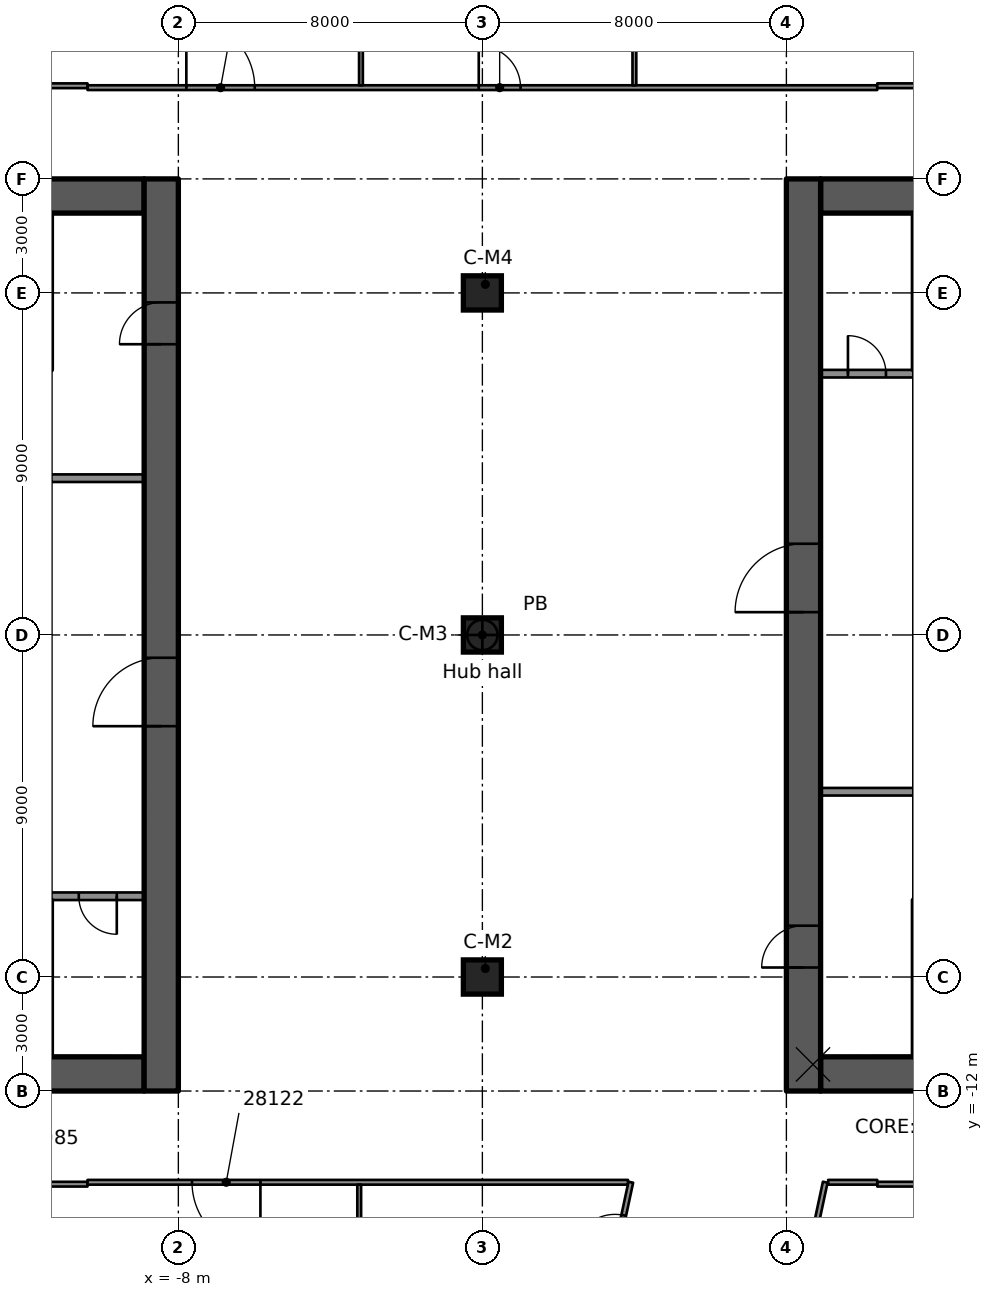
"""IFC4 building model, lengths in metres.
Left out: names, types, materials, properties, quantities, classifications, styles, units other than length and angle.
Written with IfcOpenShell. Run it as: python <this file> out.ifc"""

import sys

from ifc_helpers import new_model, si_unit, direction, frame, frame_2d, origin, origin_2d, place, context, subcontext, project, spatial, rectangle, extrude, element, fill, save


model = new_model("IFC4")
c1 = context("Model", 3, precision=1e-05, world=origin(), true_north=direction((0.0, 1.0)))
c2 = subcontext(c1, "Body", "Model", "MODEL_VIEW")
j1 = project(units=[si_unit("LENGTHUNIT", "METRE"), si_unit("PLANEANGLEUNIT", "RADIAN")], contexts=[c1])
p1 = place(None, origin())
s1 = spatial("IfcSite", under=j1, at=p1, CompositionType="ELEMENT")
p2 = place(p1, origin())
s2 = spatial("IfcBuilding", under=s1, at=p2, CompositionType="ELEMENT")
p3 = place(p2, frame((0.0, 0.0, 145.6)))
s3 = spatial("IfcBuildingStorey", under=s2, at=p3, CompositionType="ELEMENT", Elevation=145.6)
p4 = place(p3, frame((-18.1, 11.55, 0.0), z_axis=(0.0, 0.0, 1.0), x_axis=(1.0, 0.0, 0.0)))
e1 = element("IfcWall", 1, at=p4, inside=s3, PredefinedType="SHEAR", context=c2, shape_type="SweptSolid", body=[
    extrude(rectangle(XDim=9.2, YDim=0.9, at=frame_2d((4.6, 0.0))), origin(), (0.0, 0.0, 1.0), 3.5),
])
p5 = place(p4, frame((5.1, 0.0, 0.0)))
e2 = element("IfcOpeningElement", 2, at=p5, cuts=e1, PredefinedType="OPENING", context=c2, shape_type="SweptSolid", body=[
    extrude(rectangle(XDim=1.1, YDim=2.1, at=frame_2d((0.55, 1.05))), frame((0.0, 0.46, 0.0), z_axis=(0.0, -1.0, 0.0), x_axis=(1.0, 0.0, 0.0)), (0.0, 0.0, 1.0), 0.92),
])
p6 = place(p3, frame((-18.1, -11.55, 0.0), z_axis=(0.0, 0.0, 1.0), x_axis=(1.0, 0.0, 0.0)))
e3 = element("IfcWall", 3, at=p6, inside=s3, PredefinedType="SHEAR", context=c2, shape_type="SweptSolid", body=[
    extrude(rectangle(XDim=9.2, YDim=0.9, at=frame_2d((4.6, 0.0))), origin(), (0.0, 0.0, 1.0), 3.5),
])
p7 = place(p6, frame((5.1, 0.0, 0.0)))
e4 = element("IfcOpeningElement", 4, at=p7, cuts=e3, PredefinedType="OPENING", context=c2, shape_type="SweptSolid", body=[
    extrude(rectangle(XDim=1.1, YDim=2.1, at=frame_2d((0.55, 1.05))), frame((0.0, 0.46, 0.0), z_axis=(0.0, -1.0, 0.0), x_axis=(1.0, 0.0, 0.0)), (0.0, 0.0, 1.0), 0.92),
])
p8 = place(p3, frame((-8.45, -12.0, 0.0), z_axis=(0.0, 0.0, 1.0), x_axis=(0.0, 1.0, 0.0)))
e5 = element("IfcWall", 5, at=p8, inside=s3, PredefinedType="SHEAR", context=c2, shape_type="SweptSolid", body=[
    extrude(rectangle(XDim=24.0, YDim=0.9, at=frame_2d((12.0, 0.0))), origin(), (0.0, 0.0, 1.0), 3.5),
])
p9 = place(p8, frame((9.6, 0.0, 0.0)))
e6 = element("IfcOpeningElement", 6, at=p9, cuts=e5, PredefinedType="OPENING", context=c2, shape_type="SweptSolid", body=[
    extrude(rectangle(XDim=1.8, YDim=2.1, at=frame_2d((0.9, 1.05))), frame((0.0, 0.46, 0.0), z_axis=(0.0, -1.0, 0.0), x_axis=(1.0, 0.0, 0.0)), (0.0, 0.0, 1.0), 0.92),
])
p10 = place(p8, frame((19.65, 0.0, 0.0)))
e7 = element("IfcOpeningElement", 7, at=p10, cuts=e5, PredefinedType="OPENING", context=c2, shape_type="SweptSolid", body=[
    extrude(rectangle(XDim=1.1, YDim=2.1, at=frame_2d((0.55, 1.05))), frame((0.0, 0.46, 0.0), z_axis=(0.0, -1.0, 0.0), x_axis=(1.0, 0.0, 0.0)), (0.0, 0.0, 1.0), 0.92),
])
p11 = place(p3, frame((8.9, 11.55, 0.0), z_axis=(0.0, 0.0, 1.0), x_axis=(1.0, 0.0, 0.0)))
e8 = element("IfcWall", 8, at=p11, inside=s3, PredefinedType="SHEAR", context=c2, shape_type="SweptSolid", body=[
    extrude(rectangle(XDim=9.2, YDim=0.9, at=frame_2d((4.6, 0.0))), origin(), (0.0, 0.0, 1.0), 3.5),
])
p12 = place(p11, frame((3.0, 0.0, 0.0)))
e9 = element("IfcOpeningElement", 9, at=p12, cuts=e8, PredefinedType="OPENING", context=c2, shape_type="SweptSolid", body=[
    extrude(rectangle(XDim=1.1, YDim=2.1, at=frame_2d((0.55, 1.05))), frame((0.0, 0.46, 0.0), z_axis=(0.0, -1.0, 0.0), x_axis=(1.0, 0.0, 0.0)), (0.0, 0.0, 1.0), 0.92),
])
p13 = place(p3, frame((8.9, -11.55, 0.0), z_axis=(0.0, 0.0, 1.0), x_axis=(1.0, 0.0, 0.0)))
e10 = element("IfcWall", 10, at=p13, inside=s3, PredefinedType="SHEAR", context=c2, shape_type="SweptSolid", body=[
    extrude(rectangle(XDim=9.2, YDim=0.9, at=frame_2d((4.6, 0.0))), origin(), (0.0, 0.0, 1.0), 3.5),
])
p14 = place(p13, frame((3.0, 0.0, 0.0)))
e11 = element("IfcOpeningElement", 11, at=p14, cuts=e10, PredefinedType="OPENING", context=c2, shape_type="SweptSolid", body=[
    extrude(rectangle(XDim=1.1, YDim=2.1, at=frame_2d((0.55, 1.05))), frame((0.0, 0.46, 0.0), z_axis=(0.0, -1.0, 0.0), x_axis=(1.0, 0.0, 0.0)), (0.0, 0.0, 1.0), 0.92),
])
p15 = place(p3, frame((8.45, -12.0, 0.0), z_axis=(0.0, 0.0, 1.0), x_axis=(0.0, 1.0, 0.0)))
e12 = element("IfcWall", 12, at=p15, inside=s3, PredefinedType="SHEAR", context=c2, shape_type="SweptSolid", body=[
    extrude(rectangle(XDim=24.0, YDim=0.9, at=frame_2d((12.0, 0.0))), origin(), (0.0, 0.0, 1.0), 3.5),
])
p16 = place(p15, frame((12.6, 0.0, 0.0)))
e13 = element("IfcOpeningElement", 13, at=p16, cuts=e12, PredefinedType="OPENING", context=c2, shape_type="SweptSolid", body=[
    extrude(rectangle(XDim=1.8, YDim=2.1, at=frame_2d((0.9, 1.05))), frame((0.0, 0.46, 0.0), z_axis=(0.0, -1.0, 0.0), x_axis=(1.0, 0.0, 0.0)), (0.0, 0.0, 1.0), 0.92),
])
p17 = place(p15, frame((3.25, 0.0, 0.0)))
e14 = element("IfcOpeningElement", 14, at=p17, cuts=e12, PredefinedType="OPENING", context=c2, shape_type="SweptSolid", body=[
    extrude(rectangle(XDim=1.1, YDim=2.1, at=frame_2d((0.55, 1.05))), frame((0.0, 0.46, 0.0), z_axis=(0.0, -1.0, 0.0), x_axis=(1.0, 0.0, 0.0)), (0.0, 0.0, 1.0), 0.92),
])
for number, where, z_axis, x_axis in (
    (15, (0.0, -9.0, 0.0), (0.0, 0.0, 1.0), (1.0, 0.0, 0.0)),
    (16, (0.0, 0.0, 0.0), (0.0, 0.0, 1.0), (1.0, 0.0, 0.0)),
    (17, (0.0, 9.0, 0.0), (0.0, 0.0, 1.0), (1.0, 0.0, 0.0)),
):
    element("IfcColumn", number, at=place(p3, frame(where, z_axis=z_axis, x_axis=x_axis)), inside=s3, PredefinedType="COLUMN", context=c2, shape_type="SweptSolid", body=[
        extrude(rectangle(XDim=1.0, YDim=0.9, at=origin_2d()), origin(), (0.0, 0.0, 1.0), 3.5),
    ])
p18 = place(p3, frame((-8.9, 4.125, 0.0), z_axis=(0.0, 0.0, 1.0), x_axis=(-1.0, 0.0, 0.0)))
e18 = element("IfcWall", 18, at=p18, inside=s3, PredefinedType="PARTITIONING", context=c2, shape_type="SweptSolid", body=[
    extrude(rectangle(XDim=2.44, YDim=0.2, at=frame_2d((1.22, 0.0))), origin(), (0.0, 0.0, 1.0), 3.09),
])
p19 = place(p3, frame((-8.9, -6.875, 0.0), z_axis=(0.0, 0.0, 1.0), x_axis=(-1.0, 0.0, 0.0)))
e19 = element("IfcWall", 19, at=p19, inside=s3, PredefinedType="PARTITIONING", context=c2, shape_type="SweptSolid", body=[
    extrude(rectangle(XDim=2.44, YDim=0.2, at=frame_2d((1.22, 0.0))), origin(), (0.0, 0.0, 1.0), 3.09),
])
p20 = place(p19, frame((0.72, 0.0, 0.0)))
e20 = element("IfcOpeningElement", 20, at=p20, cuts=e19, PredefinedType="OPENING", context=c2, shape_type="SweptSolid", body=[
    extrude(rectangle(XDim=1.0, YDim=2.1, at=frame_2d((0.5, 1.05))), frame((0.0, 0.11, 0.0), z_axis=(0.0, -1.0, 0.0), x_axis=(1.0, 0.0, 0.0)), (0.0, 0.0, 1.0), 0.22),
])
p21 = place(p3, frame((8.9, -4.125, 0.0), z_axis=(0.0, 0.0, 1.0), x_axis=(1.0, 0.0, 0.0)))
e21 = element("IfcWall", 21, at=p21, inside=s3, PredefinedType="PARTITIONING", context=c2, shape_type="SweptSolid", body=[
    extrude(rectangle(XDim=2.44, YDim=0.2, at=frame_2d((1.22, 0.0))), origin(), (0.0, 0.0, 1.0), 3.09),
])
p22 = place(p3, frame((8.9, 6.875, 0.0), z_axis=(0.0, 0.0, 1.0), x_axis=(1.0, 0.0, 0.0)))
e22 = element("IfcWall", 22, at=p22, inside=s3, PredefinedType="PARTITIONING", context=c2, shape_type="SweptSolid", body=[
    extrude(rectangle(XDim=2.44, YDim=0.2, at=frame_2d((1.22, 0.0))), origin(), (0.0, 0.0, 1.0), 3.09),
])
p23 = place(p22, frame((0.72, 0.0, 0.0)))
e23 = element("IfcOpeningElement", 23, at=p23, cuts=e22, PredefinedType="OPENING", context=c2, shape_type="SweptSolid", body=[
    extrude(rectangle(XDim=1.0, YDim=2.1, at=frame_2d((0.5, 1.05))), frame((0.0, 0.11, 0.0), z_axis=(0.0, -1.0, 0.0), x_axis=(1.0, 0.0, 0.0)), (0.0, 0.0, 1.0), 0.22),
])
p24 = place(p3, frame((-17.476, -14.451, 0.0), z_axis=(0.0, 0.0, 1.0), x_axis=(1.0, 0.0, 0.0)))
e24 = element("IfcWall", 24, at=p24, inside=s3, PredefinedType="PARTITIONING", context=c2, shape_type="SweptSolid", body=[
    extrude(rectangle(XDim=7.085, YDim=0.125, at=frame_2d((3.542, 0.0))), origin(), (0.0, 0.0, 1.0), 3.08),
])
p25 = place(p3, frame((21.06, -14.451, 0.0), z_axis=(0.0, 0.0, 1.0), x_axis=(-1.0, 0.0, 0.0)))
e25 = element("IfcWall", 25, at=p25, inside=s3, PredefinedType="PARTITIONING", context=c2, shape_type="SweptSolid", body=[
    extrude(rectangle(XDim=10.669, YDim=0.125, at=frame_2d((5.334, 0.0))), origin(), (0.0, 0.0, 1.0), 3.08),
])
p26 = place(p25, frame((4.85, 0.0, 0.0)))
e26 = element("IfcOpeningElement", 26, at=p26, cuts=e25, PredefinedType="OPENING", context=c2, shape_type="SweptSolid", body=[
    extrude(rectangle(XDim=0.9, YDim=2.1, at=frame_2d((0.45, 1.05))), frame((0.0, 0.073, 0.0), z_axis=(0.0, -1.0, 0.0), x_axis=(1.0, 0.0, 0.0)), (0.0, 0.0, 1.0), 0.145),
])
p27 = place(p3, frame((3.831, -14.401, 0.0), z_axis=(0.0, 0.0, 1.0), x_axis=(-1.0, 0.0, 0.0)))
e27 = element("IfcWall", 27, at=p27, inside=s3, PredefinedType="PARTITIONING", context=c2, shape_type="SweptSolid", body=[
    extrude(rectangle(XDim=14.221, YDim=0.125, at=frame_2d((7.11, 0.0))), origin(), (0.0, 0.0, 1.0), 3.08),
])
p28 = place(p27, frame((9.672, 0.0, 0.0)))
e28 = element("IfcOpeningElement", 28, at=p28, cuts=e27, PredefinedType="OPENING", context=c2, shape_type="SweptSolid", body=[
    extrude(rectangle(XDim=1.8, YDim=2.1, at=frame_2d((0.9, 1.05))), frame((0.0, 0.073, 0.0), z_axis=(0.0, -1.0, 0.0), x_axis=(1.0, 0.0, 0.0)), (0.0, 0.0, 1.0), 0.145),
])
p29 = place(p3, frame((9.099, -14.401, 0.0), z_axis=(0.0, 0.0, 1.0), x_axis=(1.0, 0.0, 0.0)))
e29 = element("IfcWall", 29, at=p29, inside=s3, PredefinedType="PARTITIONING", context=c2, shape_type="SweptSolid", body=[
    extrude(rectangle(XDim=1.292, YDim=0.125, at=frame_2d((0.646, 0.0))), origin(), (0.0, 0.0, 1.0), 3.08),
])
p30 = place(p3, frame((-10.39, 14.401, 0.0), z_axis=(0.0, 0.0, 1.0), x_axis=(1.0, 0.0, 0.0)))
e30 = element("IfcWall", 30, at=p30, inside=s3, PredefinedType="PARTITIONING", context=c2, shape_type="SweptSolid", body=[
    extrude(rectangle(XDim=20.781, YDim=0.125, at=frame_2d((10.391, 0.0))), origin(), (0.0, 0.0, 1.0), 3.08),
])
p31 = place(p30, frame((10.295, 0.0, 0.0)))
e31 = element("IfcOpeningElement", 31, at=p31, cuts=e30, PredefinedType="OPENING", context=c2, shape_type="SweptSolid", body=[
    extrude(rectangle(XDim=1.1, YDim=2.1, at=frame_2d((0.55, 1.05))), frame((0.0, 0.073, 0.0), z_axis=(0.0, -1.0, 0.0), x_axis=(1.0, 0.0, 0.0)), (0.0, 0.0, 1.0), 0.145),
])
p32 = place(p30, frame((2.6, 0.0, 0.0)))
e32 = element("IfcOpeningElement", 32, at=p32, cuts=e30, PredefinedType="OPENING", context=c2, shape_type="SweptSolid", body=[
    extrude(rectangle(XDim=1.8, YDim=2.1, at=frame_2d((0.9, 1.05))), frame((0.0, 0.073, 0.0), z_axis=(0.0, -1.0, 0.0), x_axis=(1.0, 0.0, 0.0)), (0.0, 0.0, 1.0), 0.145),
])
p33 = place(p3, frame((-21.387, 14.451, 0.0), z_axis=(0.0, 0.0, 1.0), x_axis=(1.0, 0.0, 0.0)))
e33 = element("IfcWall", 33, at=p33, inside=s3, PredefinedType="PARTITIONING", context=c2, shape_type="SweptSolid", body=[
    extrude(rectangle(XDim=10.996, YDim=0.125, at=frame_2d((5.498, 0.0))), origin(), (0.0, 0.0, 1.0), 3.08),
])
p34 = place(p33, frame((3.788, 0.0, 0.0)))
e34 = element("IfcOpeningElement", 34, at=p34, cuts=e33, PredefinedType="OPENING", context=c2, shape_type="SweptSolid", body=[
    extrude(rectangle(XDim=1.8, YDim=2.1, at=frame_2d((0.9, 1.05))), frame((0.0, 0.073, 0.0), z_axis=(0.0, -1.0, 0.0), x_axis=(1.0, 0.0, 0.0)), (0.0, 0.0, 1.0), 0.145),
])
p35 = place(p3, frame((10.391, 14.451, 0.0), z_axis=(0.0, 0.0, 1.0), x_axis=(1.0, 0.0, 0.0)))
e35 = element("IfcWall", 35, at=p35, inside=s3, PredefinedType="PARTITIONING", context=c2, shape_type="SweptSolid", body=[
    extrude(rectangle(XDim=10.996, YDim=0.125, at=frame_2d((5.498, 0.0))), origin(), (0.0, 0.0, 1.0), 3.08),
])
p36 = place(p35, frame((7.38, 0.0, 0.0)))
e36 = element("IfcOpeningElement", 36, at=p36, cuts=e35, PredefinedType="OPENING", context=c2, shape_type="SweptSolid", body=[
    extrude(rectangle(XDim=1.8, YDim=2.1, at=frame_2d((0.9, 1.05))), frame((0.0, 0.073, 0.0), z_axis=(0.0, -1.0, 0.0), x_axis=(1.0, 0.0, 0.0)), (0.0, 0.0, 1.0), 0.145),
])
p37 = place(p35, frame((1.85, 0.0, 0.0)))
e37 = element("IfcOpeningElement", 37, at=p37, cuts=e35, PredefinedType="OPENING", context=c2, shape_type="SweptSolid", body=[
    extrude(rectangle(XDim=1.8, YDim=2.1, at=frame_2d((0.9, 1.05))), frame((0.0, 0.073, 0.0), z_axis=(0.0, -1.0, 0.0), x_axis=(1.0, 0.0, 0.0)), (0.0, 0.0, 1.0), 0.145),
])
p38 = place(p3, frame((9.022, -14.399, 0.0), z_axis=(0.0, 0.0, 1.0), x_axis=(-0.209107827196, -0.977892589503, 0.0)))
e38 = element("IfcWall", 38, at=p38, inside=s3, PredefinedType="PARTITIONING", context=c2, shape_type="SweptSolid", body=[
    extrude(rectangle(XDim=15.595, YDim=0.125, at=frame_2d((7.797, 0.0))), origin(), (0.0, 0.0, 1.0), 3.08),
])
p39 = place(p38, frame((12.101, 0.0, 0.0)))
e39 = element("IfcOpeningElement", 39, at=p39, cuts=e38, PredefinedType="OPENING", context=c2, shape_type="SweptSolid", body=[
    extrude(rectangle(XDim=0.9, YDim=2.1, at=frame_2d((0.45, 1.05))), frame((0.0, 0.073, 0.0), z_axis=(0.0, -1.0, 0.0), x_axis=(1.0, 0.0, 0.0)), (0.0, 0.0, 1.0), 0.145),
])
p40 = place(p3, frame((0.061, -32.387, 0.0), z_axis=(0.0, 0.0, 1.0), x_axis=(0.209029624493, 0.977909308721, 0.0)))
e40 = element("IfcWall", 40, at=p40, inside=s3, PredefinedType="PARTITIONING", context=c2, shape_type="SweptSolid", body=[
    extrude(rectangle(XDim=18.394, YDim=0.125, at=frame_2d((9.197, 0.0))), origin(), (0.0, 0.0, 1.0), 3.08),
])
p41 = place(p40, frame((8.624, 0.0, 0.0)))
e41 = element("IfcOpeningElement", 41, at=p41, cuts=e40, PredefinedType="OPENING", context=c2, shape_type="SweptSolid", body=[
    extrude(rectangle(XDim=1.1, YDim=2.1, at=frame_2d((0.55, 1.05))), frame((0.0, 0.073, 0.0), z_axis=(0.0, -1.0, 0.0), x_axis=(1.0, 0.0, 0.0)), (0.0, 0.0, 1.0), 0.145),
])
p42 = place(p40, frame((16.404, 0.0, 0.0)))
e42 = element("IfcOpeningElement", 42, at=p42, cuts=e40, PredefinedType="OPENING", context=c2, shape_type="SweptSolid", body=[
    extrude(rectangle(XDim=1.1, YDim=2.1, at=frame_2d((0.55, 1.05))), frame((0.0, 0.073, 0.0), z_axis=(0.0, -1.0, 0.0), x_axis=(1.0, 0.0, 0.0)), (0.0, 0.0, 1.0), 0.145),
])
p43 = place(p3, frame((4.0, 14.463, 0.0), z_axis=(0.0, 0.0, 1.0), x_axis=(0.0, 1.0, 0.0)))
e43 = element("IfcWall", 43, at=p43, inside=s3, PredefinedType="PARTITIONING", context=c2, shape_type="SweptSolid", body=[
    extrude(rectangle(XDim=15.576, YDim=0.1, at=frame_2d((7.788, 0.0))), origin(), (0.0, 0.0, 1.0), 3.08),
])
p44 = place(p3, frame((-3.195, 14.463, 0.0), z_axis=(0.0, 0.0, 1.0), x_axis=(0.0, 1.0, 0.0)))
e44 = element("IfcWall", 44, at=p44, inside=s3, PredefinedType="PARTITIONING", context=c2, shape_type="SweptSolid", body=[
    extrude(rectangle(XDim=16.974, YDim=0.1, at=frame_2d((8.487, 0.0))), origin(), (0.0, 0.0, 1.0), 3.08),
])
p45 = place(p3, frame((-3.241, -31.213, 0.0), z_axis=(0.0, 0.0, 1.0), x_axis=(0.0, 1.0, 0.0)))
e45 = element("IfcWall", 45, at=p45, inside=s3, PredefinedType="PARTITIONING", context=c2, shape_type="SweptSolid", body=[
    extrude(rectangle(XDim=16.75, YDim=0.1, at=frame_2d((8.375, 0.0))), origin(), (0.0, 0.0, 1.0), 3.08),
])
p46 = place(p9, origin())
e46 = element("IfcDoor", 46, at=p46, inside=s3, OperationType="SINGLE_SWING_LEFT", PredefinedType="DOOR", context=c2, shape_type="SweptSolid", body=[
    extrude(rectangle(XDim=1.8, YDim=2.1, at=frame_2d((0.9, 1.05))), frame((0.0, 0.025, 0.0), z_axis=(0.0, -1.0, 0.0), x_axis=(1.0, 0.0, 0.0)), (0.0, 0.0, 1.0), 0.05),
])
fill(e6, e46)
p47 = place(p10, origin())
e47 = element("IfcDoor", 47, at=p47, inside=s3, OperationType="SINGLE_SWING_RIGHT", PredefinedType="DOOR", context=c2, shape_type="SweptSolid", body=[
    extrude(rectangle(XDim=1.1, YDim=2.1, at=frame_2d((0.55, 1.05))), frame((0.0, 0.025, 0.0), z_axis=(0.0, -1.0, 0.0), x_axis=(1.0, 0.0, 0.0)), (0.0, 0.0, 1.0), 0.05),
])
fill(e7, e47)
p48 = place(p20, origin())
e48 = element("IfcDoor", 48, at=p48, inside=s3, OperationType="SINGLE_SWING_RIGHT", PredefinedType="DOOR", context=c2, shape_type="SweptSolid", body=[
    extrude(rectangle(XDim=1.0, YDim=2.1, at=frame_2d((0.5, 1.05))), frame((0.0, 0.025, 0.0), z_axis=(0.0, -1.0, 0.0), x_axis=(1.0, 0.0, 0.0)), (0.0, 0.0, 1.0), 0.05),
])
fill(e20, e48)
p49 = place(p16, origin())
e49 = element("IfcDoor", 49, at=p49, inside=s3, OperationType="SINGLE_SWING_RIGHT", PredefinedType="DOOR", context=c2, shape_type="SweptSolid", body=[
    extrude(rectangle(XDim=1.8, YDim=2.1, at=frame_2d((0.9, 1.05))), frame((0.0, 0.025, 0.0), z_axis=(0.0, -1.0, 0.0), x_axis=(1.0, 0.0, 0.0)), (0.0, 0.0, 1.0), 0.05),
])
fill(e13, e49)
p50 = place(p17, origin())
e50 = element("IfcDoor", 50, at=p50, inside=s3, OperationType="SINGLE_SWING_LEFT", PredefinedType="DOOR", context=c2, shape_type="SweptSolid", body=[
    extrude(rectangle(XDim=1.1, YDim=2.1, at=frame_2d((0.55, 1.05))), frame((0.0, 0.025, 0.0), z_axis=(0.0, -1.0, 0.0), x_axis=(1.0, 0.0, 0.0)), (0.0, 0.0, 1.0), 0.05),
])
fill(e14, e50)
p51 = place(p23, origin())
e51 = element("IfcDoor", 51, at=p51, inside=s3, OperationType="SINGLE_SWING_RIGHT", PredefinedType="DOOR", context=c2, shape_type="SweptSolid", body=[
    extrude(rectangle(XDim=1.0, YDim=2.1, at=frame_2d((0.5, 1.05))), frame((0.0, 0.025, 0.0), z_axis=(0.0, -1.0, 0.0), x_axis=(1.0, 0.0, 0.0)), (0.0, 0.0, 1.0), 0.05),
])
fill(e23, e51)
p52 = place(p28, origin())
e52 = element("IfcDoor", 52, at=p52, inside=s3, OperationType="DOUBLE_DOOR_SINGLE_SWING", PredefinedType="DOOR", context=c2, shape_type="SweptSolid", body=[
    extrude(rectangle(XDim=1.8, YDim=2.1, at=frame_2d((0.9, 1.05))), frame((0.0, 0.025, 0.0), z_axis=(0.0, -1.0, 0.0), x_axis=(1.0, 0.0, 0.0)), (0.0, 0.0, 1.0), 0.05),
])
fill(e28, e52)
p53 = place(p42, origin())
e53 = element("IfcDoor", 53, at=p53, inside=s3, OperationType="SINGLE_SWING_RIGHT", PredefinedType="DOOR", context=c2, shape_type="SweptSolid", body=[
    extrude(rectangle(XDim=1.1, YDim=2.1, at=frame_2d((0.55, 1.05))), frame((0.0, 0.025, 0.0), z_axis=(0.0, -1.0, 0.0), x_axis=(1.0, 0.0, 0.0)), (0.0, 0.0, 1.0), 0.05),
])
fill(e42, e53)
p54 = place(p31, origin())
e54 = element("IfcDoor", 54, at=p54, inside=s3, OperationType="SINGLE_SWING_RIGHT", PredefinedType="DOOR", context=c2, shape_type="SweptSolid", body=[
    extrude(rectangle(XDim=1.1, YDim=2.1, at=frame_2d((0.55, 1.05))), frame((0.0, 0.025, 0.0), z_axis=(0.0, -1.0, 0.0), x_axis=(1.0, 0.0, 0.0)), (0.0, 0.0, 1.0), 0.05),
])
fill(e31, e54)
p55 = place(p32, origin())
e55 = element("IfcDoor", 55, at=p55, inside=s3, OperationType="DOUBLE_DOOR_SINGLE_SWING", PredefinedType="DOOR", context=c2, shape_type="SweptSolid", body=[
    extrude(rectangle(XDim=1.8, YDim=2.1, at=frame_2d((0.9, 1.05))), frame((0.0, 0.025, 0.0), z_axis=(0.0, -1.0, 0.0), x_axis=(1.0, 0.0, 0.0)), (0.0, 0.0, 1.0), 0.05),
])
fill(e32, e55)
save(model, sys.argv[1])
